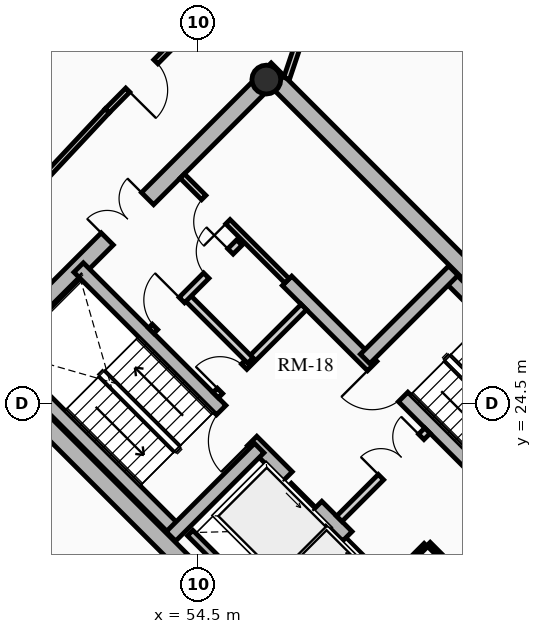
"""IFC4 building model, lengths in metres.
Left out: names, types, materials, properties, quantities, classifications, styles, units other than length and angle.
Written with IfcOpenShell. Run it as: python <this file> out.ifc"""

import sys

from ifc_helpers import new_model, si_unit, direction, frame, frame_2d, origin, origin_2d, place, context, subcontext, project, spatial, rectangle, hollow_circle, extrude, source, transform, mapped, element, fill, save


model = new_model("IFC4")
c1 = context("Model", 3, precision=1e-05, world=origin(), true_north=direction((0.0, 1.0)))
c2 = subcontext(c1, "Body", "Model", "MODEL_VIEW")
j1 = project(units=[si_unit("LENGTHUNIT", "METRE"), si_unit("PLANEANGLEUNIT", "RADIAN")], contexts=[c1])
p1 = place(None, origin())
s1 = spatial("IfcSite", under=j1, at=p1, CompositionType="ELEMENT")
p2 = place(p1, origin())
s2 = spatial("IfcBuilding", under=s1, at=p2, CompositionType="ELEMENT")
p3 = place(p2, frame((0.0, 0.0, 136.6)))
s3 = spatial("IfcBuildingStorey", under=s2, at=p3, CompositionType="ELEMENT", Elevation=136.6)
for number, where, z_axis, x_axis in (
    (1, (58.737, 15.697, 0.0), (0.0, 0.0, 1.0), (-0.707, 0.707, 0.0)),
    (2, (66.303, 23.263, 0.0), (0.0, 0.0, 1.0), (-0.707, 0.707, 0.0)),
):
    element("IfcWall", number, at=place(p3, frame(where, z_axis=z_axis, x_axis=x_axis)), inside=s3, PredefinedType="SHEAR", context=c2, shape_type="SweptSolid", body=[
        extrude(rectangle(XDim=14.2, YDim=0.45, at=frame_2d((7.1, 0.0))), origin(), (0.0, 0.0, 1.0), 3.72),
    ])
p4 = place(p3, frame((58.578, 15.856, 0.0), z_axis=(0.0, 0.0, 1.0), x_axis=(0.707106781187, 0.707106781187, 0.0)))
e3 = element("IfcWall", 3, at=p4, inside=s3, PredefinedType="SHEAR", context=c2, shape_type="SweptSolid", body=[
    extrude(rectangle(XDim=10.7, YDim=0.45, at=frame_2d((5.35, 0.0))), origin(), (0.0, 0.0, 1.0), 3.72),
])
m1 = source(origin(), c2, "Body", "SweptSolid", [
    extrude(rectangle(XDim=1.5, YDim=2.02, at=frame_2d((0.75, 1.01))), frame((0.0, 0.235, 0.0), z_axis=(0.0, -1.0, 0.0), x_axis=(1.0, 0.0, 0.0)), (0.0, 0.0, 1.0), 0.47),
])
p5 = place(p4, frame((5.45, 0.0, 0.0)))
e4 = element("IfcOpeningElement", 4, at=p5, cuts=e3, PredefinedType="OPENING", context=c2, shape_type="MappedRepresentation", body=[
    mapped(m1, transform((0.0, 0.0, 0.0), x_axis=(1.0, 0.0, 0.0), y_axis=(0.0, 1.0, 0.0), z_axis=(0.0, 0.0, 1.0), scale=1.0)),
])
p6 = place(p3, frame((48.856, 25.578, 0.0), z_axis=(0.0, 0.0, 1.0), x_axis=(0.707106781187, 0.707106781187, 0.0)))
e5 = element("IfcWall", 5, at=p6, inside=s3, PredefinedType="SHEAR", context=c2, shape_type="SweptSolid", body=[
    extrude(rectangle(XDim=10.7, YDim=0.45, at=frame_2d((5.35, 0.0))), origin(), (0.0, 0.0, 1.0), 3.72),
])
p7 = place(p6, frame((4.6, 0.0, 0.0)))
e6 = element("IfcOpeningElement", 6, at=p7, cuts=e5, PredefinedType="OPENING", context=c2, shape_type="MappedRepresentation", body=[
    mapped(m1, transform((0.0, 0.0, 0.0), x_axis=(1.0, 0.0, 0.0), y_axis=(0.0, 1.0, 0.0), z_axis=(0.0, 0.0, 1.0), scale=1.0)),
])
p8 = place(p3, frame((61.078, 18.355, 0.0), z_axis=(0.0, 0.0, 1.0), x_axis=(-0.707106781187, 0.707106781187, 0.0)))
e7 = element("IfcWall", 7, at=p8, inside=s3, PredefinedType="SHEAR", context=c2, shape_type="SweptSolid", body=[
    extrude(rectangle(XDim=13.75, YDim=0.35, at=frame_2d((6.875, 0.0))), origin(), (0.0, 0.0, 1.0), 3.72),
])
m2 = source(origin(), c2, "Body", "SweptSolid", [
    extrude(rectangle(XDim=1.1, YDim=2.015, at=frame_2d((0.55, 1.007))), frame((0.0, 0.185, 0.0), z_axis=(0.0, -1.0, 0.0), x_axis=(1.0, 0.0, 0.0)), (0.0, 0.0, 1.0), 0.37),
])
p9 = place(p8, frame((4.875, 0.0, 0.0)))
e8 = element("IfcOpeningElement", 8, at=p9, cuts=e7, PredefinedType="OPENING", context=c2, shape_type="MappedRepresentation", body=[
    mapped(m2, transform((0.0, 0.0, 0.0), x_axis=(1.0, 0.0, 0.0), y_axis=(0.0, 1.0, 0.0), z_axis=(0.0, 0.0, 1.0), scale=1.0)),
])
p10 = place(p8, frame((0.65, 0.0, 0.0)))
e9 = element("IfcOpeningElement", 9, at=p10, cuts=e7, PredefinedType="OPENING", context=c2, shape_type="MappedRepresentation", body=[
    mapped(m2, transform((0.0, 0.0, 0.0), x_axis=(1.0, 0.0, 0.0), y_axis=(0.0, 1.0, 0.0), z_axis=(0.0, 0.0, 1.0), scale=1.0)),
])
p11 = place(p8, frame((2.65, 0.0, 0.0)))
e10 = element("IfcOpeningElement", 10, at=p11, cuts=e7, PredefinedType="OPENING", context=c2, shape_type="MappedRepresentation", body=[
    mapped(m2, transform((0.0, 0.0, 0.0), x_axis=(1.0, 0.0, 0.0), y_axis=(0.0, 1.0, 0.0), z_axis=(0.0, 0.0, 1.0), scale=1.0)),
])
m3 = source(origin(), c2, "Body", "SweptSolid", [
    extrude(rectangle(XDim=1.15, YDim=2.02, at=frame_2d((0.575, 1.01))), frame((0.0, 0.185, 0.0), z_axis=(0.0, -1.0, 0.0), x_axis=(1.0, 0.0, 0.0)), (0.0, 0.0, 1.0), 0.37),
])
p12 = place(p8, frame((7.295, 0.0, 0.0)))
e11 = element("IfcOpeningElement", 11, at=p12, cuts=e7, PredefinedType="OPENING", context=c2, shape_type="MappedRepresentation", body=[
    mapped(m3, transform((0.0, 0.0, 0.0), x_axis=(1.0, 0.0, 0.0), y_axis=(0.0, 1.0, 0.0), z_axis=(0.0, 0.0, 1.0), scale=1.0)),
])
p13 = place(p3, frame((63.645, 20.922, 0.0), z_axis=(0.0, 0.0, 1.0), x_axis=(-0.70711946392, 0.707094098226, 0.0)))
e12 = element("IfcWall", 12, at=p13, inside=s3, PredefinedType="SHEAR", context=c2, shape_type="SweptSolid", body=[
    extrude(rectangle(XDim=9.625, YDim=0.35, at=frame_2d((4.812, 0.0))), origin(), (0.0, 0.0, 1.0), 3.72),
])
p14 = place(p13, frame((5.305, 0.0, 0.0)))
e13 = element("IfcOpeningElement", 13, at=p14, cuts=e12, PredefinedType="OPENING", context=c2, shape_type="MappedRepresentation", body=[
    mapped(m3, transform((0.0, 0.0, 0.0), x_axis=(1.0, 0.0, 0.0), y_axis=(0.0, 1.0, 0.0), z_axis=(0.0, 0.0, 1.0), scale=1.0)),
])
p15 = place(p3, frame((53.922, 21.141, 0.0), z_axis=(0.0, 0.0, 1.0), x_axis=(-0.707088616009, 0.707124945897, 0.0)))
e14 = element("IfcWall", 14, at=p15, inside=s3, PredefinedType="SHEAR", context=c2, shape_type="SweptSolid", body=[
    extrude(rectangle(XDim=6.72, YDim=0.35, at=frame_2d((3.36, 0.0))), origin(), (0.0, 0.0, 1.0), 3.72),
])
p16 = place(p3, frame((53.784, 21.003, 0.0), z_axis=(0.0, 0.0, 1.0), x_axis=(0.707106781187, 0.707106781187, 0.0)))
e15 = element("IfcWall", 15, at=p16, inside=s3, PredefinedType="SHEAR", context=c2, shape_type="SweptSolid", body=[
    extrude(rectangle(XDim=3.285, YDim=0.35, at=frame_2d((1.643, 0.0))), origin(), (0.0, 0.0, 1.0), 3.72),
])
p17 = place(p3, frame((65.83, 23.107, 0.0), z_axis=(0.0, 0.0, 1.0), x_axis=(-0.707088616009, 0.707124945897, 0.0)))
e16 = element("IfcWall", 16, at=p17, inside=s3, PredefinedType="SHEAR", context=c2, shape_type="SweptSolid", body=[
    extrude(rectangle(XDim=6.72, YDim=0.35, at=frame_2d((3.36, 0.0))), origin(), (0.0, 0.0, 1.0), 3.72),
])
p18 = place(p3, frame((58.893, 25.674, 0.0), z_axis=(0.0, 0.0, 1.0), x_axis=(0.707106781187, 0.707106781187, 0.0)))
e17 = element("IfcWall", 17, at=p18, inside=s3, PredefinedType="SHEAR", context=c2, shape_type="SweptSolid", body=[
    extrude(rectangle(XDim=3.285, YDim=0.35, at=frame_2d((1.643, 0.0))), origin(), (0.0, 0.0, 1.0), 3.72),
])
p19 = place(p3, frame((56.294, 33.024, 0.0), z_axis=(0.0, 0.0, 1.0), x_axis=(0.707106781187, 0.707106781187, 0.0)))
e18 = element("IfcColumn", 18, at=p19, inside=s3, PredefinedType="COLUMN", context=c2, shape_type="SweptSolid", body=[
    extrude(hollow_circle(Radius=0.38, WallThickness=0.032, at=origin_2d()), origin(), (0.0, 0.0, 1.0), 3.72),
])
p20 = place(p3, frame((55.888, 19.069, 0.0), z_axis=(0.0, 0.0, 1.0), x_axis=(0.707106781187, 0.707106781187, 0.0)))
e19 = element("IfcWall", 19, at=p20, inside=s3, PredefinedType="SHEAR", context=c2, shape_type="SweptSolid", body=[
    extrude(rectangle(XDim=2.97, YDim=0.2, at=frame_2d((1.485, 0.0))), origin(), (0.0, 0.0, 1.0), 3.72),
])
p21 = place(p3, frame((56.015, 19.366, 0.0), z_axis=(0.0, 0.0, 1.0), x_axis=(-0.707106781187, 0.707106781187, 0.0)))
e20 = element("IfcWall", 20, at=p21, inside=s3, PredefinedType="SHEAR", context=c2, shape_type="SweptSolid", body=[
    extrude(rectangle(XDim=2.44, YDim=0.2, at=frame_2d((1.22, 0.0))), origin(), (0.0, 0.0, 1.0), 3.72),
])
p22 = place(p3, frame((58.214, 21.467, 0.0), z_axis=(0.0, 0.0, 1.0), x_axis=(0.707106781187, 0.707106781187, 0.0)))
e21 = element("IfcWall", 21, at=p22, inside=s3, PredefinedType="PARTITIONING", context=c2, shape_type="SweptSolid", body=[
    extrude(rectangle(XDim=3.28, YDim=0.2, at=frame_2d((1.64, 0.0))), origin(), (0.0, 0.0, 1.0), 3.425),
])
m4 = source(origin(), c2, "Body", "SweptSolid", [
    extrude(rectangle(XDim=1.5, YDim=2.02, at=frame_2d((0.75, 1.01))), frame((0.0, 0.11, 0.0), z_axis=(0.0, -1.0, 0.0), x_axis=(1.0, 0.0, 0.0)), (0.0, 0.0, 1.0), 0.22),
])
p23 = place(p22, frame((1.55, 0.0, 0.0)))
e22 = element("IfcOpeningElement", 22, at=p23, cuts=e21, PredefinedType="OPENING", context=c2, shape_type="MappedRepresentation", body=[
    mapped(m4, transform((0.0, 0.0, 0.0), x_axis=(1.0, 0.0, 0.0), y_axis=(0.0, 1.0, 0.0), z_axis=(0.0, 0.0, 1.0), scale=1.0)),
])
p24 = place(p3, frame((54.961, 24.719, 0.0), z_axis=(0.0, 0.0, 1.0), x_axis=(0.707106781187, 0.707106781187, 0.0)))
e23 = element("IfcWall", 23, at=p24, inside=s3, PredefinedType="PARTITIONING", context=c2, shape_type="SweptSolid", body=[
    extrude(rectangle(XDim=3.28, YDim=0.2, at=frame_2d((1.64, 0.0))), origin(), (0.0, 0.0, 1.0), 3.425),
])
m5 = source(origin(), c2, "Body", "SweptSolid", [
    extrude(rectangle(XDim=0.9, YDim=2.005, at=frame_2d((0.45, 1.002))), frame((0.0, 0.11, 0.0), z_axis=(0.0, -1.0, 0.0), x_axis=(1.0, 0.0, 0.0)), (0.0, 0.0, 1.0), 0.22),
])
p25 = place(p24, frame((0.16, 0.0, 0.0)))
e24 = element("IfcOpeningElement", 24, at=p25, cuts=e23, PredefinedType="OPENING", context=c2, shape_type="MappedRepresentation", body=[
    mapped(m5, transform((0.0, 0.0, 0.0), x_axis=(1.0, 0.0, 0.0), y_axis=(0.0, 1.0, 0.0), z_axis=(0.0, 0.0, 1.0), scale=1.0)),
])
p26 = place(p3, frame((55.874, 25.631, 0.0), z_axis=(0.0, 0.0, 1.0), x_axis=(-0.707157639372, 0.707055919343, 0.0)))
e25 = element("IfcWall", 25, at=p26, inside=s3, PredefinedType="PARTITIONING", context=c2, shape_type="SweptSolid", body=[
    extrude(rectangle(XDim=2.4, YDim=0.2, at=frame_2d((1.2, 0.0))), origin(), (0.0, 0.0, 1.0), 3.425),
])
p27 = place(p3, frame((53.264, 26.416, 0.0), z_axis=(0.0, 0.0, 1.0), x_axis=(0.707106781187, 0.707106781187, 0.0)))
e26 = element("IfcWall", 26, at=p27, inside=s3, PredefinedType="PARTITIONING", context=c2, shape_type="SweptSolid", body=[
    extrude(rectangle(XDim=3.28, YDim=0.2, at=frame_2d((1.64, 0.0))), origin(), (0.0, 0.0, 1.0), 3.425),
])
m6 = source(origin(), c2, "Body", "SweptSolid", [
    extrude(rectangle(XDim=1.0, YDim=2.015, at=frame_2d((0.5, 1.007))), frame((0.0, 0.11, 0.0), z_axis=(0.0, -1.0, 0.0), x_axis=(1.0, 0.0, 0.0)), (0.0, 0.0, 1.0), 0.22),
])
p28 = place(p27, frame((0.14, 0.0, 0.0)))
e27 = element("IfcOpeningElement", 27, at=p28, cuts=e26, PredefinedType="OPENING", context=c2, shape_type="MappedRepresentation", body=[
    mapped(m6, transform((0.0, 0.0, 0.0), x_axis=(1.0, 0.0, 0.0), y_axis=(0.0, 1.0, 0.0), z_axis=(0.0, 0.0, 1.0), scale=1.0)),
])
p29 = place(p27, frame((2.05, 0.0, 0.0)))
e28 = element("IfcOpeningElement", 28, at=p29, cuts=e26, PredefinedType="OPENING", context=c2, shape_type="MappedRepresentation", body=[
    mapped(m5, transform((0.0, 0.0, 0.0), x_axis=(1.0, 0.0, 0.0), y_axis=(0.0, 1.0, 0.0), z_axis=(0.0, 0.0, 1.0), scale=1.0)),
])
p30 = place(p3, frame((61.835, 19.529, 0.0), z_axis=(0.0, 0.0, 1.0), x_axis=(-0.707174592913, 0.707038962956, 0.0)))
e29 = element("IfcWall", 29, at=p30, inside=s3, PredefinedType="PARTITIONING", context=c2, shape_type="SweptSolid", body=[
    extrude(rectangle(XDim=1.8, YDim=0.125, at=frame_2d((0.9, 0.0))), origin(), (0.0, 0.0, 1.0), 3.425),
])
m7 = source(origin(), c2, "Body", "SweptSolid", [
    extrude(rectangle(XDim=0.9, YDim=2.005, at=frame_2d((0.45, 1.002))), frame((0.0, 0.073, 0.0), z_axis=(0.0, -1.0, 0.0), x_axis=(1.0, 0.0, 0.0)), (0.0, 0.0, 1.0), 0.145),
])
p31 = place(p30, frame((0.42, 0.0, 0.0)))
e30 = element("IfcOpeningElement", 30, at=p31, cuts=e29, PredefinedType="OPENING", context=c2, shape_type="MappedRepresentation", body=[
    mapped(m7, transform((0.0, 0.0, 0.0), x_axis=(1.0, 0.0, 0.0), y_axis=(0.0, 1.0, 0.0), z_axis=(0.0, 0.0, 1.0), scale=1.0)),
])
p32 = place(p3, frame((59.713, 19.996, 0.0), z_axis=(0.0, 0.0, 1.0), x_axis=(0.707217726, 0.706995818963, 0.0)))
e31 = element("IfcWall", 31, at=p32, inside=s3, PredefinedType="PARTITIONING", context=c2, shape_type="SweptSolid", body=[
    extrude(rectangle(XDim=1.1, YDim=0.125, at=frame_2d((0.55, 0.0))), origin(), (0.0, 0.0, 1.0), 3.425),
])
p33 = place(p3, frame((56.839, 27.728, 0.0), z_axis=(0.0, 0.0, 1.0), x_axis=(-0.707106781187, 0.707106781187, 0.0)))
e32 = element("IfcWall", 32, at=p33, inside=s3, PredefinedType="PARTITIONING", context=c2, shape_type="SweptSolid", body=[
    extrude(rectangle(XDim=3.9, YDim=0.16, at=frame_2d((1.95, 0.0))), origin(), (0.0, 0.0, 1.0), 3.425),
])
m8 = source(origin(), c2, "Body", "SweptSolid", [
    extrude(rectangle(XDim=0.9, YDim=2.005, at=frame_2d((0.45, 1.002))), frame((0.0, 0.09, 0.0), z_axis=(0.0, -1.0, 0.0), x_axis=(1.0, 0.0, 0.0)), (0.0, 0.0, 1.0), 0.18),
])
p34 = place(p33, frame((2.2, 0.0, 0.0)))
e33 = element("IfcOpeningElement", 33, at=p34, cuts=e32, PredefinedType="OPENING", context=c2, shape_type="MappedRepresentation", body=[
    mapped(m8, transform((0.0, 0.0, 0.0), x_axis=(1.0, 0.0, 0.0), y_axis=(0.0, 1.0, 0.0), z_axis=(0.0, 0.0, 1.0), scale=1.0)),
])
p35 = place(p3, frame((54.475, 34.591, 0.0), z_axis=(0.0, 0.0, 1.0), x_axis=(-0.703869646439, -0.710329163714, 0.0)))
e34 = element("IfcWall", 34, at=p35, inside=s3, PredefinedType="PARTITIONING", context=c2, shape_type="SweptSolid", body=[
    extrude(rectangle(XDim=3.364, YDim=0.15, at=frame_2d((1.682, 0.0))), origin(), (0.0, 0.0, 1.0), 2.995),
])
m9 = source(origin(), c2, "Body", "SweptSolid", [
    extrude(rectangle(XDim=1.05, YDim=2.015, at=frame_2d((0.525, 1.007))), frame((0.0, 0.085, 0.0), z_axis=(0.0, -1.0, 0.0), x_axis=(1.0, 0.0, 0.0)), (0.0, 0.0, 1.0), 0.17),
])
p36 = place(p35, frame((1.546, 0.0, 0.0)))
e35 = element("IfcOpeningElement", 35, at=p36, cuts=e34, PredefinedType="OPENING", context=c2, shape_type="MappedRepresentation", body=[
    mapped(m9, transform((0.0, 0.0, 0.0), x_axis=(1.0, 0.0, 0.0), y_axis=(0.0, 1.0, 0.0), z_axis=(0.0, 0.0, 1.0), scale=1.0)),
])
p37 = place(p3, frame((52.107, 32.202, 0.0), z_axis=(0.0, 0.0, 1.0), x_axis=(-0.682605209028, -0.730787334734, 0.0)))
e36 = element("IfcWall", 36, at=p37, inside=s3, PredefinedType="PARTITIONING", context=c2, shape_type="SweptSolid", body=[
    extrude(rectangle(XDim=6.486, YDim=0.15, at=frame_2d((3.243, 0.0))), origin(), (0.0, 0.0, 1.0), 2.995),
])
p38 = place(p3, frame((47.786, 23.242, 0.0), z_axis=(0.0, 0.0, 1.0), x_axis=(0.696183456981, -0.717863910659, 0.0)))
e37 = element("IfcWall", 37, at=p38, inside=s3, PredefinedType="PARTITIONING", context=c2, shape_type="SweptSolid", body=[
    extrude(rectangle(XDim=5.979, YDim=0.15, at=frame_2d((2.99, 0.0))), origin(), (0.0, 0.0, 1.0), 3.425),
])
p39 = place(p3, frame((56.828, 33.056, 0.0), z_axis=(0.0, 0.0, 1.0), x_axis=(0.319439175969, 0.94760678177, 0.0)))
e38 = element("IfcWall", 38, at=p39, inside=s3, PredefinedType="PARTITIONING", context=c2, shape_type="SweptSolid", body=[
    extrude(rectangle(XDim=2.074, YDim=0.16, at=frame_2d((1.037, 0.0))), origin(), (0.0, 0.0, 1.0), 2.995),
])
m10 = source(origin(), c2, "Body", "SweptSolid", [
    extrude(rectangle(XDim=1.05, YDim=2.015, at=frame_2d((0.525, 1.007))), frame((0.0, 0.09, 0.0), z_axis=(0.0, -1.0, 0.0), x_axis=(1.0, 0.0, 0.0)), (0.0, 0.0, 1.0), 0.18),
])
p40 = place(p39, frame((0.824, 0.0, 0.0)))
e39 = element("IfcOpeningElement", 39, at=p40, cuts=e38, PredefinedType="OPENING", context=c2, shape_type="MappedRepresentation", body=[
    mapped(m10, transform((0.0, 0.0, 0.0), x_axis=(1.0, 0.0, 0.0), y_axis=(0.0, 1.0, 0.0), z_axis=(0.0, 0.0, 1.0), scale=1.0)),
])
m11 = source(origin(), c2, "Body", "SweptSolid", [
    extrude(rectangle(XDim=1.1, YDim=2.015, at=frame_2d((0.55, 1.007))), frame((0.0, 0.025, 0.0), z_axis=(0.0, -1.0, 0.0), x_axis=(1.0, 0.0, 0.0)), (0.0, 0.0, 1.0), 0.05),
])
p41 = place(p9, origin())
e40 = element("IfcDoor", 40, at=p41, inside=s3, OperationType="SLIDING_TO_LEFT", PredefinedType="DOOR", context=c2, shape_type="MappedRepresentation", body=[
    mapped(m11, transform((0.0, 0.0, 0.0), x_axis=(1.0, 0.0, 0.0), y_axis=(0.0, 1.0, 0.0), z_axis=(0.0, 0.0, 1.0), scale=1.0)),
])
fill(e8, e40)
p42 = place(p11, origin())
e41 = element("IfcDoor", 41, at=p42, inside=s3, OperationType="SLIDING_TO_RIGHT", PredefinedType="DOOR", context=c2, shape_type="MappedRepresentation", body=[
    mapped(m11, transform((0.0, 0.0, 0.0), x_axis=(1.0, 0.0, 0.0), y_axis=(0.0, 1.0, 0.0), z_axis=(0.0, 0.0, 1.0), scale=1.0)),
])
fill(e10, e41)
m12 = source(origin(), c2, "Body", "SweptSolid", [
    extrude(rectangle(XDim=1.15, YDim=2.02, at=frame_2d((0.575, 1.01))), frame((0.0, 0.025, 0.0), z_axis=(0.0, -1.0, 0.0), x_axis=(1.0, 0.0, 0.0)), (0.0, 0.0, 1.0), 0.05),
])
p43 = place(p12, origin())
e42 = element("IfcDoor", 42, at=p43, inside=s3, OperationType="SINGLE_SWING_LEFT", PredefinedType="DOOR", context=c2, shape_type="MappedRepresentation", body=[
    mapped(m12, transform((0.0, 0.0, 0.0), x_axis=(1.0, 0.0, 0.0), y_axis=(0.0, 1.0, 0.0), z_axis=(0.0, 0.0, 1.0), scale=1.0)),
])
fill(e11, e42)
p44 = place(p14, origin())
e43 = element("IfcDoor", 43, at=p44, inside=s3, OperationType="SINGLE_SWING_RIGHT", PredefinedType="DOOR", context=c2, shape_type="MappedRepresentation", body=[
    mapped(m12, transform((0.0, 0.0, 0.0), x_axis=(1.0, 0.0, 0.0), y_axis=(0.0, 1.0, 0.0), z_axis=(0.0, 0.0, 1.0), scale=1.0)),
])
fill(e13, e43)
m13 = source(origin(), c2, "Body", "SweptSolid", [
    extrude(rectangle(XDim=1.5, YDim=2.02, at=frame_2d((0.75, 1.01))), frame((0.0, 0.025, 0.0), z_axis=(0.0, -1.0, 0.0), x_axis=(1.0, 0.0, 0.0)), (0.0, 0.0, 1.0), 0.05),
])
p45 = place(p7, origin())
e44 = element("IfcDoor", 44, at=p45, inside=s3, OperationType="DOUBLE_DOOR_SINGLE_SWING", PredefinedType="DOOR", context=c2, shape_type="MappedRepresentation", body=[
    mapped(m13, transform((0.0, 0.0, 0.0), x_axis=(1.0, 0.0, 0.0), y_axis=(0.0, 1.0, 0.0), z_axis=(0.0, 0.0, 1.0), scale=1.0)),
])
fill(e6, e44)
p46 = place(p23, origin())
e45 = element("IfcDoor", 45, at=p46, inside=s3, OperationType="DOUBLE_DOOR_SINGLE_SWING", PredefinedType="DOOR", context=c2, shape_type="MappedRepresentation", body=[
    mapped(m13, transform((0.0, 0.0, 0.0), x_axis=(1.0, 0.0, 0.0), y_axis=(0.0, 1.0, 0.0), z_axis=(0.0, 0.0, 1.0), scale=1.0)),
])
fill(e22, e45)
m14 = source(origin(), c2, "Body", "SweptSolid", [
    extrude(rectangle(XDim=0.9, YDim=2.005, at=frame_2d((0.45, 1.002))), frame((0.0, 0.025, 0.0), z_axis=(0.0, -1.0, 0.0), x_axis=(1.0, 0.0, 0.0)), (0.0, 0.0, 1.0), 0.05),
])
p47 = place(p25, origin())
e46 = element("IfcDoor", 46, at=p47, inside=s3, OperationType="SINGLE_SWING_LEFT", PredefinedType="DOOR", context=c2, shape_type="MappedRepresentation", body=[
    mapped(m14, transform((0.0, 0.0, 0.0), x_axis=(1.0, 0.0, 0.0), y_axis=(0.0, 1.0, 0.0), z_axis=(0.0, 0.0, 1.0), scale=1.0)),
])
fill(e24, e46)
m15 = source(origin(), c2, "Body", "SweptSolid", [
    extrude(rectangle(XDim=1.0, YDim=2.015, at=frame_2d((0.5, 1.007))), frame((0.0, 0.025, 0.0), z_axis=(0.0, -1.0, 0.0), x_axis=(1.0, 0.0, 0.0)), (0.0, 0.0, 1.0), 0.05),
])
p48 = place(p28, origin())
e47 = element("IfcDoor", 47, at=p48, inside=s3, OperationType="SINGLE_SWING_RIGHT", PredefinedType="DOOR", context=c2, shape_type="MappedRepresentation", body=[
    mapped(m15, transform((0.0, 0.0, 0.0), x_axis=(1.0, 0.0, 0.0), y_axis=(0.0, 1.0, 0.0), z_axis=(0.0, 0.0, 1.0), scale=1.0)),
])
fill(e27, e47)
p49 = place(p29, origin())
e48 = element("IfcDoor", 48, at=p49, inside=s3, OperationType="SINGLE_SWING_RIGHT", PredefinedType="DOOR", context=c2, shape_type="MappedRepresentation", body=[
    mapped(m14, transform((0.0, 0.0, 0.0), x_axis=(1.0, 0.0, 0.0), y_axis=(0.0, 1.0, 0.0), z_axis=(0.0, 0.0, 1.0), scale=1.0)),
])
fill(e28, e48)
p50 = place(p34, origin())
e49 = element("IfcDoor", 49, at=p50, inside=s3, OperationType="SINGLE_SWING_LEFT", PredefinedType="DOOR", context=c2, shape_type="MappedRepresentation", body=[
    mapped(m14, transform((0.0, 0.0, 0.0), x_axis=(1.0, 0.0, 0.0), y_axis=(0.0, 1.0, 0.0), z_axis=(0.0, 0.0, 1.0), scale=1.0)),
])
fill(e33, e49)
m16 = source(origin(), c2, "Body", "SweptSolid", [
    extrude(rectangle(XDim=1.05, YDim=2.015, at=frame_2d((0.525, 1.007))), frame((0.0, 0.025, 0.0), z_axis=(0.0, -1.0, 0.0), x_axis=(1.0, 0.0, 0.0)), (0.0, 0.0, 1.0), 0.05),
])
p51 = place(p36, origin())
e50 = element("IfcDoor", 50, at=p51, inside=s3, OperationType="SINGLE_SWING_RIGHT", PredefinedType="DOOR", context=c2, shape_type="MappedRepresentation", body=[
    mapped(m16, transform((0.0, 0.0, 0.0), x_axis=(1.0, 0.0, 0.0), y_axis=(0.0, 1.0, 0.0), z_axis=(0.0, 0.0, 1.0), scale=1.0)),
])
fill(e35, e50)
save(model, sys.argv[1])
